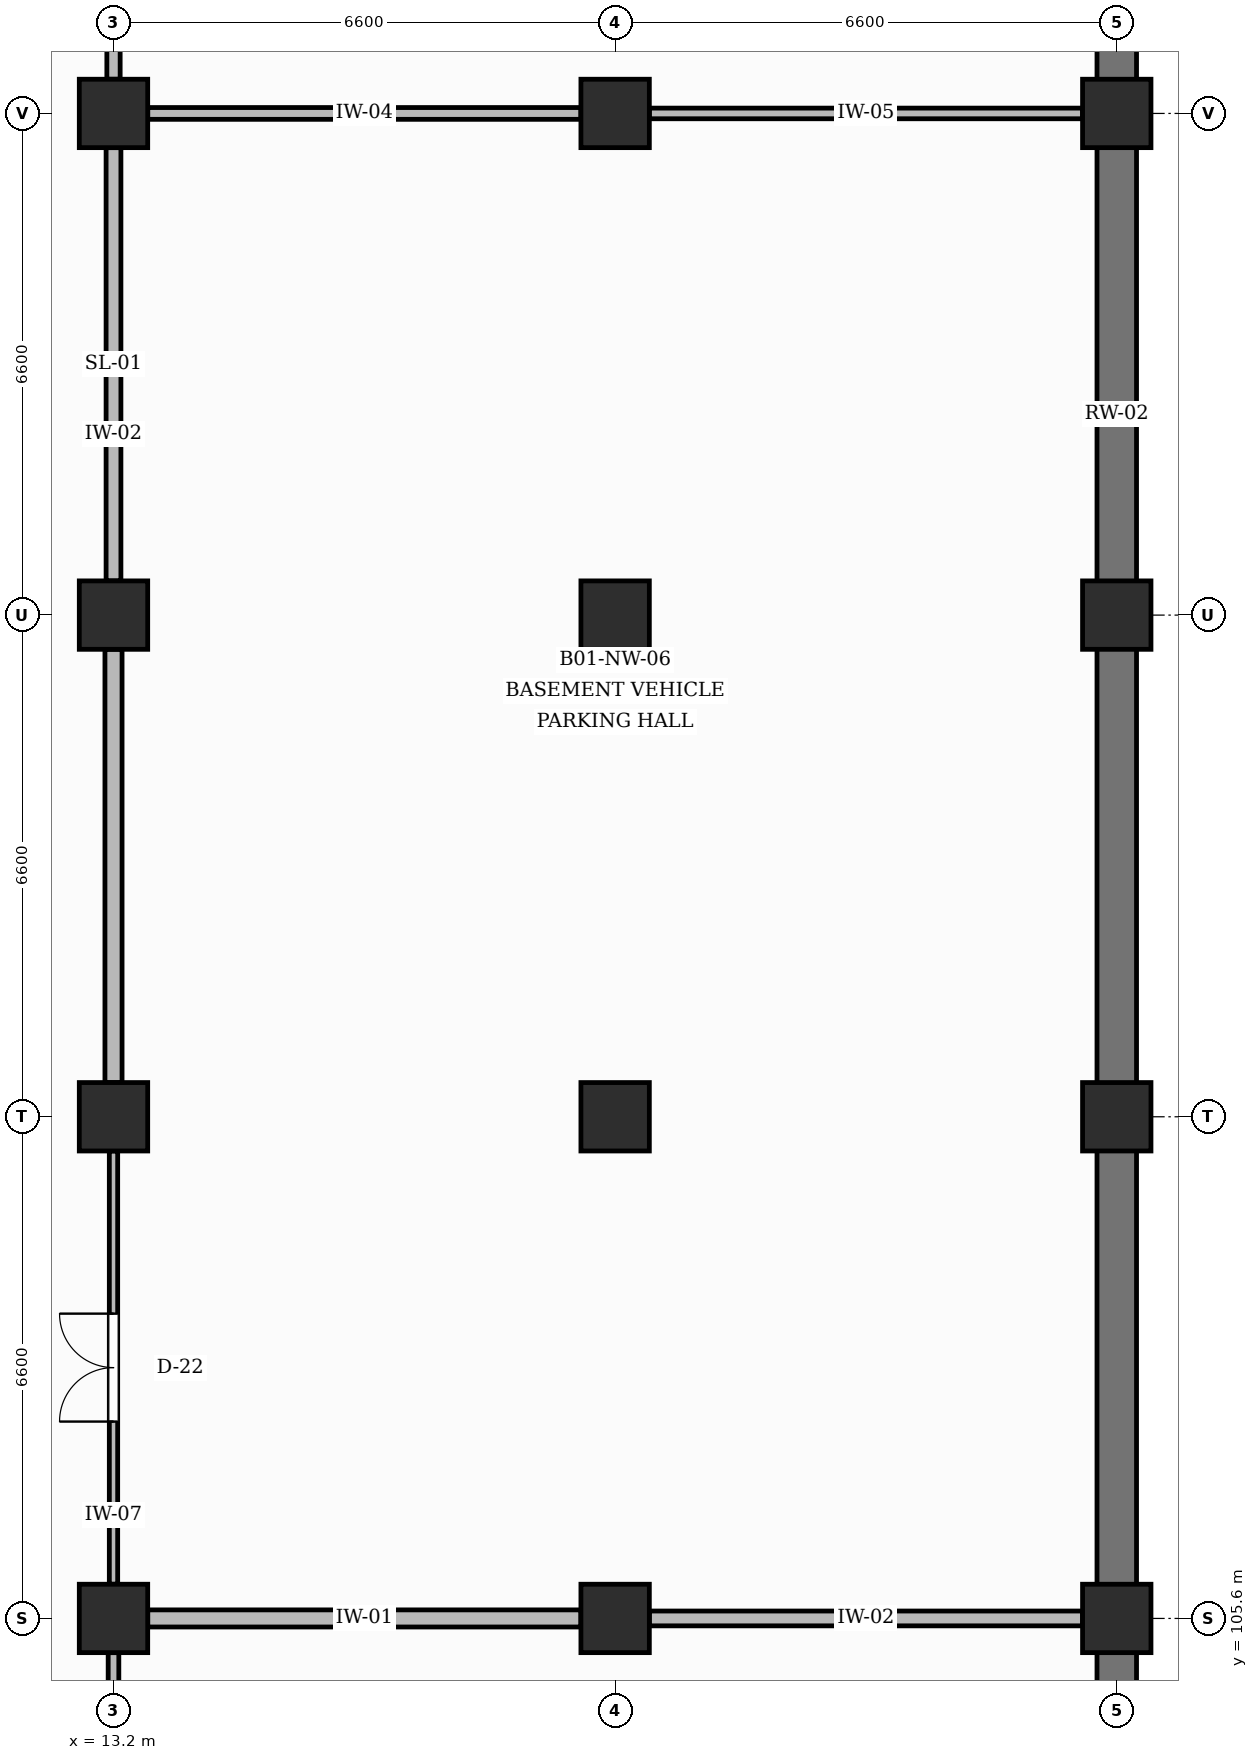
"""IFC4 building model, lengths in metres.
Left out: names, types, materials, properties, quantities, classifications, styles, units other than length and angle.
Written with IfcOpenShell. Run it as: python <this file> out.ifc"""

import sys

from ifc_helpers import new_model, si_unit, direction, frame, frame_2d, origin, origin_2d, place, context, subcontext, project, spatial, rectangle, extrude, element, fill, save


model = new_model("IFC4")
c1 = context("Model", 3, precision=1e-05, world=origin(), true_north=direction((0.0, 1.0)))
c2 = subcontext(c1, "Body", "Model", "MODEL_VIEW")
j1 = project(units=[si_unit("LENGTHUNIT", "METRE"), si_unit("PLANEANGLEUNIT", "RADIAN")], contexts=[c1])
p1 = place(None, origin())
s1 = spatial("IfcSite", under=j1, at=p1, CompositionType="ELEMENT")
p2 = place(p1, origin())
s2 = spatial("IfcBuilding", under=s1, at=p2, CompositionType="ELEMENT")
p3 = place(p2, frame((0.0, 0.0, -4.5)))
s3 = spatial("IfcBuildingStorey", under=s2, at=p3, CompositionType="ELEMENT", Elevation=-4.5)
for number, where, z_axis, x_axis in (
    (1, (13.2, 105.6, 0.0), (0.0, 0.0, 1.0), (1.0, 0.0, 0.0)),
    (2, (13.2, 112.2, 0.0), (0.0, 0.0, 1.0), (1.0, 0.0, 0.0)),
    (3, (13.2, 118.8, 0.0), (0.0, 0.0, 1.0), (1.0, 0.0, 0.0)),
    (4, (13.2, 125.4, 0.0), (0.0, 0.0, 1.0), (1.0, 0.0, 0.0)),
    (5, (19.8, 105.6, 0.0), (0.0, 0.0, 1.0), (1.0, 0.0, 0.0)),
    (6, (19.8, 112.2, 0.0), (0.0, 0.0, 1.0), (1.0, 0.0, 0.0)),
    (7, (19.8, 118.8, 0.0), (0.0, 0.0, 1.0), (1.0, 0.0, 0.0)),
    (8, (19.8, 125.4, 0.0), (0.0, 0.0, 1.0), (1.0, 0.0, 0.0)),
    (9, (26.4, 105.6, 0.0), (0.0, 0.0, 1.0), (1.0, 0.0, 0.0)),
    (10, (26.4, 112.2, 0.0), (0.0, 0.0, 1.0), (1.0, 0.0, 0.0)),
    (11, (26.4, 118.8, 0.0), (0.0, 0.0, 1.0), (1.0, 0.0, 0.0)),
    (12, (26.4, 125.4, 0.0), (0.0, 0.0, 1.0), (1.0, 0.0, 0.0)),
):
    element("IfcColumn", number, at=place(p3, frame(where, z_axis=z_axis, x_axis=x_axis)), inside=s3, PredefinedType="COLUMN", context=c2, shape_type="SweptSolid", body=[
        extrude(rectangle(XDim=0.9, YDim=0.9, at=origin_2d()), origin(), (0.0, 0.0, 1.0), 4.5),
    ])
for number, where, z_axis, x_axis in (
    (13, (26.4, 99.45, 0.0), (0.0, 0.0, 1.0), (0.0, 1.0, 0.0)),
    (14, (26.4, 106.05, 0.0), (0.0, 0.0, 1.0), (0.0, 1.0, 0.0)),
):
    element("IfcWall", number, at=place(p3, frame(where, z_axis=z_axis, x_axis=x_axis)), inside=s3, PredefinedType="USERDEFINED", context=c2, shape_type="SweptSolid", body=[
        extrude(rectangle(XDim=5.7, YDim=0.52, at=frame_2d((2.85, 0.0))), origin(), (0.0, 0.0, 1.0), 3.49),
    ])
p4 = place(p3, frame((26.4, 112.65, 0.0), z_axis=(0.0, 0.0, 1.0), x_axis=(0.0, 1.0, 0.0)))
e15 = element("IfcWall", 15, at=p4, inside=s3, PredefinedType="USERDEFINED", context=c2, shape_type="SweptSolid", body=[
    extrude(rectangle(XDim=5.7, YDim=0.52, at=frame_2d((2.85, 0.0))), origin(), (0.0, 0.0, 1.0), 3.49),
])
for number, where, z_axis, x_axis in (
    (16, (26.4, 119.25, 0.0), (0.0, 0.0, 1.0), (0.0, 1.0, 0.0)),
    (17, (26.4, 125.85, 0.0), (0.0, 0.0, 1.0), (0.0, 1.0, 0.0)),
):
    element("IfcWall", number, at=place(p3, frame(where, z_axis=z_axis, x_axis=x_axis)), inside=s3, PredefinedType="USERDEFINED", context=c2, shape_type="SweptSolid", body=[
        extrude(rectangle(XDim=5.7, YDim=0.52, at=frame_2d((2.85, 0.0))), origin(), (0.0, 0.0, 1.0), 3.49),
    ])
p5 = place(p3, frame((13.2, 99.45, 0.0), z_axis=(0.0, 0.0, 1.0), x_axis=(0.0, 1.0, 0.0)))
e18 = element("IfcWall", 18, at=p5, inside=s3, PredefinedType="PARTITIONING", context=c2, shape_type="SweptSolid", body=[
    extrude(rectangle(XDim=5.7, YDim=0.14, at=frame_2d((2.85, 0.0))), origin(), (0.0, 0.0, 1.0), 3.34),
])
p6 = place(p3, frame((13.2, 106.05, 0.0), z_axis=(0.0, 0.0, 1.0), x_axis=(0.0, 1.0, 0.0)))
e19 = element("IfcWall", 19, at=p6, inside=s3, PredefinedType="PARTITIONING", context=c2, shape_type="SweptSolid", body=[
    extrude(rectangle(XDim=5.7, YDim=0.11, at=frame_2d((2.85, 0.0))), origin(), (0.0, 0.0, 1.0), 3.34),
])
p7 = place(p6, frame((2.14, 0.0, 0.0)))
e20 = element("IfcOpeningElement", 20, at=p7, cuts=e19, PredefinedType="OPENING", context=c2, shape_type="SweptSolid", body=[
    extrude(rectangle(XDim=1.42, YDim=2.2, at=frame_2d((0.71, 1.1))), frame((0.0, 0.065, 0.0), z_axis=(0.0, -1.0, 0.0), x_axis=(1.0, 0.0, 0.0)), (0.0, 0.0, 1.0), 0.13),
])
p8 = place(p3, frame((13.2, 112.65, 0.0), z_axis=(0.0, 0.0, 1.0), x_axis=(0.0, 1.0, 0.0)))
e21 = element("IfcWall", 21, at=p8, inside=s3, PredefinedType="PARTITIONING", context=c2, shape_type="SweptSolid", body=[
    extrude(rectangle(XDim=5.7, YDim=0.225, at=frame_2d((2.85, 0.0))), origin(), (0.0, 0.0, 1.0), 3.34),
])
p9 = place(p3, frame((13.2, 119.25, 0.0), z_axis=(0.0, 0.0, 1.0), x_axis=(0.0, 1.0, 0.0)))
e22 = element("IfcWall", 22, at=p9, inside=s3, PredefinedType="PARTITIONING", context=c2, shape_type="SweptSolid", body=[
    extrude(rectangle(XDim=5.7, YDim=0.195, at=frame_2d((2.85, 0.0))), origin(), (0.0, 0.0, 1.0), 3.34),
])
p10 = place(p3, frame((13.2, 125.85, 0.0), z_axis=(0.0, 0.0, 1.0), x_axis=(0.0, 1.0, 0.0)))
e23 = element("IfcWall", 23, at=p10, inside=s3, PredefinedType="PARTITIONING", context=c2, shape_type="SweptSolid", body=[
    extrude(rectangle(XDim=5.7, YDim=0.175, at=frame_2d((2.85, 0.0))), origin(), (0.0, 0.0, 1.0), 3.34),
])
p11 = place(p10, frame((2.24, 0.0, 0.0)))
e24 = element("IfcOpeningElement", 24, at=p11, cuts=e23, PredefinedType="OPENING", context=c2, shape_type="SweptSolid", body=[
    extrude(rectangle(XDim=1.22, YDim=2.15, at=frame_2d((0.61, 1.075))), frame((0.0, 0.097, 0.0), z_axis=(0.0, -1.0, 0.0), x_axis=(1.0, 0.0, 0.0)), (0.0, 0.0, 1.0), 0.195),
])
p12 = place(p3, frame((13.65, 105.6, 0.0), z_axis=(0.0, 0.0, 1.0), x_axis=(1.0, 0.0, 0.0)))
e25 = element("IfcWall", 25, at=p12, inside=s3, PredefinedType="PARTITIONING", context=c2, shape_type="SweptSolid", body=[
    extrude(rectangle(XDim=5.7, YDim=0.225, at=frame_2d((2.85, 0.0))), origin(), (0.0, 0.0, 1.0), 3.24),
])
p13 = place(p3, frame((13.65, 125.4, 0.0), z_axis=(0.0, 0.0, 1.0), x_axis=(1.0, 0.0, 0.0)))
e26 = element("IfcWall", 26, at=p13, inside=s3, PredefinedType="PARTITIONING", context=c2, shape_type="SweptSolid", body=[
    extrude(rectangle(XDim=5.7, YDim=0.155, at=frame_2d((2.85, 0.0))), origin(), (0.0, 0.0, 1.0), 3.34),
])
p14 = place(p3, frame((20.25, 105.6, 0.0), z_axis=(0.0, 0.0, 1.0), x_axis=(1.0, 0.0, 0.0)))
e27 = element("IfcWall", 27, at=p14, inside=s3, PredefinedType="PARTITIONING", context=c2, shape_type="SweptSolid", body=[
    extrude(rectangle(XDim=5.7, YDim=0.195, at=frame_2d((2.85, 0.0))), origin(), (0.0, 0.0, 1.0), 3.34),
])
p15 = place(p3, frame((20.25, 125.4, 0.0), z_axis=(0.0, 0.0, 1.0), x_axis=(1.0, 0.0, 0.0)))
e28 = element("IfcWall", 28, at=p15, inside=s3, PredefinedType="PARTITIONING", context=c2, shape_type="SweptSolid", body=[
    extrude(rectangle(XDim=5.7, YDim=0.14, at=frame_2d((2.85, 0.0))), origin(), (0.0, 0.0, 1.0), 3.24),
])
p16 = place(p7, origin())
e29 = element("IfcDoor", 29, at=p16, inside=s3, OperationType="DOUBLE_DOOR_SINGLE_SWING", PredefinedType="DOOR", context=c2, shape_type="SweptSolid", body=[
    extrude(rectangle(XDim=1.42, YDim=2.2, at=frame_2d((0.71, 1.1))), frame((0.0, 0.025, 0.0), z_axis=(0.0, -1.0, 0.0), x_axis=(1.0, 0.0, 0.0)), (0.0, 0.0, 1.0), 0.05),
])
fill(e20, e29)
save(model, sys.argv[1])
